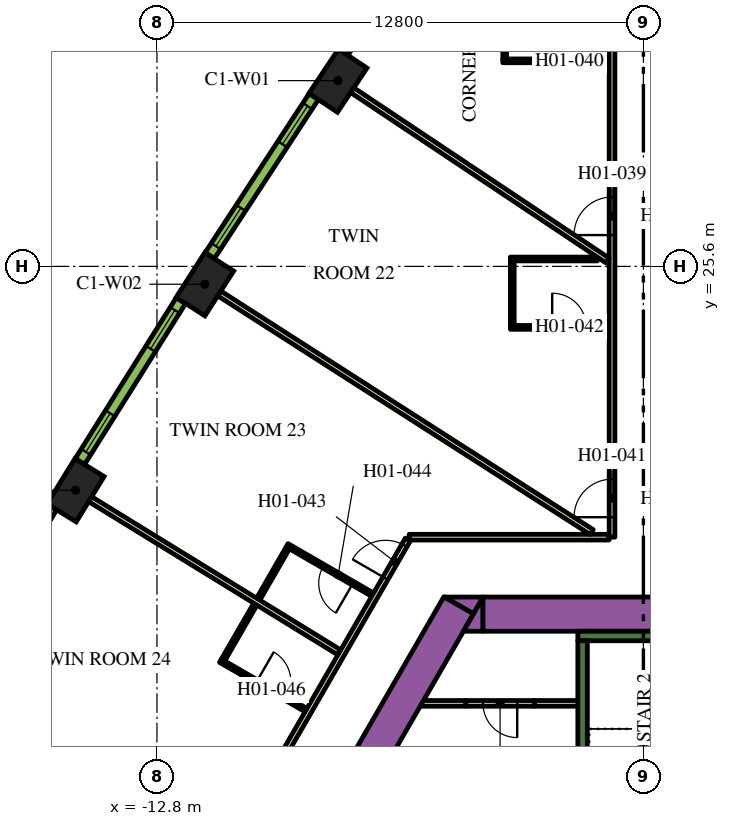
"""IFC4 building model, lengths in metres.
Left out: names, types, materials, properties, quantities, classifications, styles, units other than length and angle.
Written with IfcOpenShell. Run it as: python <this file> out.ifc"""

import sys

from ifc_helpers import new_model, si_unit, direction, frame, frame_2d, origin, origin_2d, place, context, subcontext, project, spatial, polyline, rectangle, outline, extrude, element, fill, save


model = new_model("IFC4")
c1 = context("Model", 3, precision=1e-05, world=origin(), true_north=direction((0.0, 1.0)))
c2 = subcontext(c1, "Body", "Model", "MODEL_VIEW")
j1 = project(units=[si_unit("LENGTHUNIT", "METRE"), si_unit("PLANEANGLEUNIT", "RADIAN")], contexts=[c1])
p1 = place(None, origin())
s1 = spatial("IfcSite", under=j1, at=p1, CompositionType="ELEMENT")
p2 = place(p1, origin())
s2 = spatial("IfcBuilding", under=s1, at=p2, CompositionType="ELEMENT")
p3 = place(p2, frame((0.0, 0.0, 31.5)))
s3 = spatial("IfcBuildingStorey", under=s2, at=p3, CompositionType="ELEMENT", Elevation=31.5)
for number, where, z_axis, x_axis in (
    (1, (-8.037, 30.487, 0.0), (0.0, 0.0, 1.0), (-0.555, -0.832, 0.0)),
    (2, (-11.539, 25.131, 0.0), (0.0, 0.0, 1.0), (-0.539, -0.842, 0.0)),
    (3, (-14.942, 19.71, 0.0), (0.0, 0.0, 1.0), (-0.524, -0.852, 0.0)),
):
    element("IfcColumn", number, at=place(p3, frame(where, z_axis=z_axis, x_axis=x_axis)), inside=s3, PredefinedType="COLUMN", context=c2, shape_type="SweptSolid", body=[
        extrude(rectangle(XDim=1.4, YDim=0.9, at=origin_2d()), origin(), (0.0, 0.0, 1.0), 3.9),
    ])
p4 = place(p3, frame((-15.36, -1.503, 0.0), z_axis=(0.0, 0.0, 1.0), x_axis=(0.50000389221, 0.866023156604, 0.0)))
e4 = element("IfcWall", 4, at=p4, inside=s3, PredefinedType="SOLIDWALL", context=c2, shape_type="SweptSolid", body=[
    extrude(rectangle(XDim=21.0, YDim=0.9, at=frame_2d((10.5, 0.0))), origin(), (0.0, 0.0, 1.0), 3.9),
])
p5 = place(p3, origin())
e5 = element("IfcWall", 5, at=p5, inside=s3, PredefinedType="SOLIDWALL", context=c2, shape_type="SweptSolid", body=[
    extrude(outline(polyline([(-4.215, 16.9), (-4.469, 16.46), (-5.231, 16.9), (-4.215, 16.9)])), origin(), (0.0, 0.0, 1.0), 3.9),
])
p6 = place(p3, frame((-4.224, 16.45, 0.0), z_axis=(0.0, 0.0, 1.0), x_axis=(1.0, 0.0, 0.0)))
e6 = element("IfcWall", 6, at=p6, inside=s3, PredefinedType="SOLIDWALL", context=c2, shape_type="SweptSolid", body=[
    extrude(rectangle(XDim=9.488, YDim=0.9, at=frame_2d((4.744, 0.0))), origin(), (0.0, 0.0, 1.0), 3.9),
])
e7 = element("IfcWall", 7, at=p5, inside=s3, PredefinedType="SOLIDWALL", context=c2, shape_type="SweptSolid", body=[
    extrude(outline(polyline([(-4.734, 16.0), (-4.226, 16.88), (-4.226, 16.0), (-4.734, 16.0)])), origin(), (0.0, 0.0, 1.0), 3.9),
])
p7 = place(p3, frame((-1.725, 15.875, 0.0), z_axis=(0.0, 0.0, 1.0), x_axis=(1.0, 0.0, 0.0)))
e8 = element("IfcWall", 8, at=p7, inside=s3, PredefinedType="SOLIDWALL", context=c2, shape_type="SweptSolid", body=[
    extrude(rectangle(XDim=3.45, YDim=0.25, at=frame_2d((1.725, 0.0))), origin(), (0.0, 0.0, 1.0), 3.9),
])
p8 = place(p3, frame((-1.6, 8.7, 0.0), z_axis=(0.0, 0.0, 1.0), x_axis=(0.0, 1.0, 0.0)))
e9 = element("IfcWall", 9, at=p8, inside=s3, PredefinedType="SOLIDWALL", context=c2, shape_type="SweptSolid", body=[
    extrude(rectangle(XDim=7.05, YDim=0.25, at=frame_2d((3.525, 0.0))), origin(), (0.0, 0.0, 1.0), 3.9),
])
p9 = place(p3, frame((-5.851, 14.102, 0.0), z_axis=(0.0, 0.0, 1.0), x_axis=(1.0, 0.0, 0.0)))
e10 = element("IfcWall", 10, at=p9, inside=s3, PredefinedType="PARTITIONING", context=c2, shape_type="SweptSolid", body=[
    extrude(rectangle(XDim=1.18, YDim=0.15, at=frame_2d((0.59, 0.0))), origin(), (0.0, 0.0, 1.0), 2.75),
])
p10 = place(p3, frame((-2.871, 14.102, 0.0), z_axis=(0.0, 0.0, 1.0), x_axis=(1.0, 0.0, 0.0)))
e11 = element("IfcWall", 11, at=p10, inside=s3, PredefinedType="PARTITIONING", context=c2, shape_type="SweptSolid", body=[
    extrude(rectangle(XDim=1.196, YDim=0.15, at=frame_2d((0.598, 0.0))), origin(), (0.0, 0.0, 1.0), 2.75),
])
p11 = place(p3, frame((-2.871, 14.102, 0.0), z_axis=(0.0, 0.0, 1.0), x_axis=(-1.0, 0.0, 0.0)))
e12 = element("IfcWall", 12, at=p11, inside=s3, PredefinedType="PARTITIONING", context=c2, shape_type="SweptSolid", body=[
    extrude(rectangle(XDim=1.8, YDim=0.15, at=frame_2d((0.9, 0.0))), origin(), (0.0, 0.0, 1.0), 2.75),
])
p12 = place(p11, frame((0.45, 0.0, 0.0)))
e13 = element("IfcOpeningElement", 13, at=p12, cuts=e12, PredefinedType="OPENING", context=c2, shape_type="SweptSolid", body=[
    extrude(rectangle(XDim=0.9, YDim=2.1, at=frame_2d((0.45, 1.05))), frame((0.0, 0.085, 0.0), z_axis=(0.0, -1.0, 0.0), x_axis=(1.0, 0.0, 0.0)), (0.0, 0.0, 1.0), 0.17),
])
p13 = place(p3, frame((-0.825, 18.475, 0.0), z_axis=(0.0, 0.0, 1.0), x_axis=(0.0, 1.0, 0.0)))
e14 = element("IfcWall", 14, at=p13, inside=s3, PredefinedType="PARTITIONING", context=c2, shape_type="SweptSolid", body=[
    extrude(rectangle(XDim=16.224, YDim=0.15, at=frame_2d((8.112, 0.0))), origin(), (0.0, 0.0, 1.0), 2.75),
])
p14 = place(p13, frame((7.949, 0.0, 0.0)))
e15 = element("IfcOpeningElement", 15, at=p14, cuts=e14, PredefinedType="OPENING", context=c2, shape_type="SweptSolid", body=[
    extrude(rectangle(XDim=1.0, YDim=2.1, at=frame_2d((0.5, 1.05))), frame((0.0, 0.085, 0.0), z_axis=(0.0, -1.0, 0.0), x_axis=(1.0, 0.0, 0.0)), (0.0, 0.0, 1.0), 0.17),
])
p15 = place(p13, frame((0.526, 0.0, 0.0)))
e16 = element("IfcOpeningElement", 16, at=p15, cuts=e14, PredefinedType="OPENING", context=c2, shape_type="SweptSolid", body=[
    extrude(rectangle(XDim=1.0, YDim=2.1, at=frame_2d((0.5, 1.05))), frame((0.0, 0.085, 0.0), z_axis=(0.0, -1.0, 0.0), x_axis=(1.0, 0.0, 0.0)), (0.0, 0.0, 1.0), 0.17),
])
p16 = place(p3, frame((-6.163, 18.475, 0.0), z_axis=(0.0, 0.0, 1.0), x_axis=(1.0, 0.0, 0.0)))
e17 = element("IfcWall", 17, at=p16, inside=s3, PredefinedType="PARTITIONING", context=c2, shape_type="SweptSolid", body=[
    extrude(rectangle(XDim=5.258, YDim=0.15, at=frame_2d((2.629, 0.0))), origin(), (0.0, 0.0, 1.0), 2.75),
])
p17 = place(p3, frame((-19.081, -3.9, 0.0), z_axis=(0.0, 0.0, 1.0), x_axis=(0.499998313975, 0.866026377209, 0.0)))
e18 = element("IfcWall", 18, at=p17, inside=s3, PredefinedType="PARTITIONING", context=c2, shape_type="SweptSolid", body=[
    extrude(rectangle(XDim=25.766, YDim=0.15, at=frame_2d((12.883, 0.0))), origin(), (0.0, 0.0, 1.0), 2.75),
])
p18 = place(p17, frame((24.586, 0.0, 0.0)))
e19 = element("IfcOpeningElement", 19, at=p18, cuts=e18, PredefinedType="OPENING", context=c2, shape_type="SweptSolid", body=[
    extrude(rectangle(XDim=1.0, YDim=2.1, at=frame_2d((0.5, 1.05))), frame((0.0, 0.085, 0.0), z_axis=(0.0, -1.0, 0.0), x_axis=(1.0, 0.0, 0.0)), (0.0, 0.0, 1.0), 0.17),
])
p19 = place(p17, frame((16.196, 0.0, 0.0)))
e20 = element("IfcOpeningElement", 20, at=p19, cuts=e18, PredefinedType="OPENING", context=c2, shape_type="SweptSolid", body=[
    extrude(rectangle(XDim=1.0, YDim=2.1, at=frame_2d((0.5, 1.05))), frame((0.0, 0.085, 0.0), z_axis=(0.0, -1.0, 0.0), x_axis=(1.0, 0.0, 0.0)), (0.0, 0.0, 1.0), 0.17),
])
p20 = place(p17, frame((14.789, 0.0, 0.0)))
e21 = element("IfcOpeningElement", 21, at=p20, cuts=e18, PredefinedType="OPENING", context=c2, shape_type="SweptSolid", body=[
    extrude(rectangle(XDim=1.1, YDim=2.1, at=frame_2d((0.55, 1.05))), frame((0.0, 0.085, 0.0), z_axis=(0.0, -1.0, 0.0), x_axis=(1.0, 0.0, 0.0)), (0.0, 0.0, 1.0), 0.17),
])
p21 = place(p17, frame((3.698, 0.0, 0.0)))
e22 = element("IfcOpeningElement", 22, at=p21, cuts=e18, PredefinedType="OPENING", context=c2, shape_type="SweptSolid", body=[
    extrude(rectangle(XDim=1.0, YDim=2.1, at=frame_2d((0.5, 1.05))), frame((0.0, 0.085, 0.0), z_axis=(0.0, -1.0, 0.0), x_axis=(1.0, 0.0, 0.0)), (0.0, 0.0, 1.0), 0.17),
])
p22 = place(p17, frame((1.531, 0.0, 0.0)))
e23 = element("IfcOpeningElement", 23, at=p22, cuts=e18, PredefinedType="OPENING", context=c2, shape_type="SweptSolid", body=[
    extrude(rectangle(XDim=0.9, YDim=2.1, at=frame_2d((0.45, 1.05))), frame((0.0, 0.085, 0.0), z_axis=(0.0, -1.0, 0.0), x_axis=(1.0, 0.0, 0.0)), (0.0, 0.0, 1.0), 0.17),
])
p23 = place(p3, frame((-17.856, 13.999, 0.0), z_axis=(0.0, 0.0, 1.0), x_axis=(0.861371519381, -0.507975497047, 0.0)))
e24 = element("IfcWall", 24, at=p23, inside=s3, PredefinedType="PARTITIONING", context=c2, shape_type="SweptSolid", body=[
    extrude(rectangle(XDim=7.804, YDim=0.15, at=frame_2d((3.902, 0.0))), origin(), (0.0, 0.0, 1.0), 2.75),
])
p24 = place(p3, frame((-14.558, 19.475, 0.0), z_axis=(0.0, 0.0, 1.0), x_axis=(0.851829455142, -0.523819223925, 0.0)))
e25 = element("IfcWall", 25, at=p24, inside=s3, PredefinedType="PARTITIONING", context=c2, shape_type="SweptSolid", body=[
    extrude(rectangle(XDim=7.688, YDim=0.15, at=frame_2d((3.844, 0.0))), origin(), (0.0, 0.0, 1.0), 2.75),
])
p25 = place(p3, frame((-11.16, 24.888, 0.0), z_axis=(0.0, 0.0, 1.0), x_axis=(0.84199813156, -0.539480441211, 0.0)))
e26 = element("IfcWall", 26, at=p25, inside=s3, PredefinedType="PARTITIONING", context=c2, shape_type="SweptSolid", body=[
    extrude(rectangle(XDim=11.638, YDim=0.15, at=frame_2d((5.819, 0.0))), origin(), (0.0, 0.0, 1.0), 2.75),
])
p26 = place(p3, frame((-7.662, 30.238, 0.0), z_axis=(0.0, 0.0, 1.0), x_axis=(0.831882886825, -0.554951225431, 0.0)))
e27 = element("IfcWall", 27, at=p26, inside=s3, PredefinedType="PARTITIONING", context=c2, shape_type="SweptSolid", body=[
    extrude(rectangle(XDim=8.079, YDim=0.15, at=frame_2d((4.04, 0.0))), origin(), (0.0, 0.0, 1.0), 2.75),
])
p27 = place(p3, frame((-3.7, 31.009, 0.0), z_axis=(0.0, 0.0, 1.0), x_axis=(1.0, 0.0, 0.0)))
e28 = element("IfcWall", 28, at=p27, inside=s3, PredefinedType="PARTITIONING", context=c2, shape_type="SweptSolid", body=[
    extrude(rectangle(XDim=2.8, YDim=0.1, at=frame_2d((1.4, 0.0))), origin(), (0.0, 0.0, 1.0), 2.75),
])
p28 = place(p27, frame((1.3, 0.0, 0.0)))
e29 = element("IfcOpeningElement", 29, at=p28, cuts=e28, PredefinedType="OPENING", context=c2, shape_type="SweptSolid", body=[
    extrude(rectangle(XDim=0.9, YDim=2.1, at=frame_2d((0.45, 1.05))), frame((0.0, 0.06, 0.0), z_axis=(0.0, -1.0, 0.0), x_axis=(1.0, 0.0, 0.0)), (0.0, 0.0, 1.0), 0.12),
])
p29 = place(p3, frame((-3.65, 31.059, 0.0), z_axis=(0.0, 0.0, 1.0), x_axis=(0.0, 1.0, 0.0)))
e30 = element("IfcWall", 30, at=p29, inside=s3, PredefinedType="PARTITIONING", context=c2, shape_type="SweptSolid", body=[
    extrude(rectangle(XDim=2.4, YDim=0.1, at=frame_2d((1.2, 0.0))), origin(), (0.0, 0.0, 1.0), 2.75),
])
p30 = place(p3, frame((-3.5, 23.995, 0.0), z_axis=(0.0, 0.0, 1.0), x_axis=(1.0, 0.0, 0.0)))
e31 = element("IfcWall", 31, at=p30, inside=s3, PredefinedType="PARTITIONING", context=c2, shape_type="SweptSolid", body=[
    extrude(rectangle(XDim=2.6, YDim=0.1, at=frame_2d((1.3, 0.0))), origin(), (0.0, 0.0, 1.0), 2.75),
])
p31 = place(p30, frame((1.1, 0.0, 0.0)))
e32 = element("IfcOpeningElement", 32, at=p31, cuts=e31, PredefinedType="OPENING", context=c2, shape_type="SweptSolid", body=[
    extrude(rectangle(XDim=0.9, YDim=2.1, at=frame_2d((0.45, 1.05))), frame((0.0, 0.06, 0.0), z_axis=(0.0, -1.0, 0.0), x_axis=(1.0, 0.0, 0.0)), (0.0, 0.0, 1.0), 0.12),
])
p32 = place(p3, frame((-3.45, 24.045, 0.0), z_axis=(0.0, 0.0, 1.0), x_axis=(0.0, 1.0, 0.0)))
e33 = element("IfcWall", 33, at=p32, inside=s3, PredefinedType="PARTITIONING", context=c2, shape_type="SweptSolid", body=[
    extrude(rectangle(XDim=1.7, YDim=0.1, at=frame_2d((0.85, 0.0))), origin(), (0.0, 0.0, 1.0), 2.75),
])
p33 = place(p3, frame((-1.21, 25.795, 0.0), z_axis=(0.0, 0.0, 1.0), x_axis=(-1.0, 0.0, 0.0)))
e34 = element("IfcWall", 34, at=p33, inside=s3, PredefinedType="PARTITIONING", context=c2, shape_type="SweptSolid", body=[
    extrude(rectangle(XDim=2.29, YDim=0.1, at=frame_2d((1.145, 0.0))), origin(), (0.0, 0.0, 1.0), 2.75),
])
p34 = place(p3, frame((-7.124, 16.961, 0.0), z_axis=(0.0, 0.0, 1.0), x_axis=(-0.866021400173, 0.500006934395, 0.0)))
e35 = element("IfcWall", 35, at=p34, inside=s3, PredefinedType="PARTITIONING", context=c2, shape_type="SweptSolid", body=[
    extrude(rectangle(XDim=2.6, YDim=0.1, at=frame_2d((1.3, 0.0))), origin(), (0.0, 0.0, 1.0), 2.75),
])
p35 = place(p34, frame((0.6, 0.0, 0.0)))
e36 = element("IfcOpeningElement", 36, at=p35, cuts=e35, PredefinedType="OPENING", context=c2, shape_type="SweptSolid", body=[
    extrude(rectangle(XDim=0.9, YDim=2.1, at=frame_2d((0.45, 1.05))), frame((0.0, 0.06, 0.0), z_axis=(0.0, -1.0, 0.0), x_axis=(1.0, 0.0, 0.0)), (0.0, 0.0, 1.0), 0.12),
])
p36 = place(p3, frame((-9.362, 18.184, 0.0), z_axis=(0.0, 0.0, 1.0), x_axis=(-0.499992328818, -0.866029832698, 0.0)))
e37 = element("IfcWall", 37, at=p36, inside=s3, PredefinedType="PARTITIONING", context=c2, shape_type="SweptSolid", body=[
    extrude(rectangle(XDim=1.54, YDim=0.1, at=frame_2d((0.77, 0.0))), origin(), (0.0, 0.0, 1.0), 2.75),
])
p37 = place(p3, frame((-11.129, 15.224, 0.0), z_axis=(0.0, 0.0, 1.0), x_axis=(0.866021400173, -0.500006934395, 0.0)))
e38 = element("IfcWall", 38, at=p37, inside=s3, PredefinedType="PARTITIONING", context=c2, shape_type="SweptSolid", body=[
    extrude(rectangle(XDim=2.6, YDim=0.1, at=frame_2d((1.3, 0.0))), origin(), (0.0, 0.0, 1.0), 2.75),
])
p38 = place(p37, frame((1.1, 0.0, 0.0)))
e39 = element("IfcOpeningElement", 39, at=p38, cuts=e38, PredefinedType="OPENING", context=c2, shape_type="SweptSolid", body=[
    extrude(rectangle(XDim=0.9, YDim=2.1, at=frame_2d((0.45, 1.05))), frame((0.0, 0.06, 0.0), z_axis=(0.0, -1.0, 0.0), x_axis=(1.0, 0.0, 0.0)), (0.0, 0.0, 1.0), 0.12),
])
p39 = place(p3, frame((-11.061, 15.242, 0.0), z_axis=(0.0, 0.0, 1.0), x_axis=(0.499976720371, 0.866038843867, 0.0)))
e40 = element("IfcWall", 40, at=p39, inside=s3, PredefinedType="PARTITIONING", context=c2, shape_type="SweptSolid", body=[
    extrude(rectangle(XDim=1.69, YDim=0.1, at=frame_2d((0.845, 0.0))), origin(), (0.0, 0.0, 1.0), 2.75),
])
p40 = place(p3, frame((-5.078, 35.376, 0.0), z_axis=(0.0, 0.0, 1.0), x_axis=(-0.562610153679, -0.826722332454, 0.0)))
e41 = element("IfcWall", 41, at=p40, inside=s3, PredefinedType="SOLIDWALL", context=c2, shape_type="SweptSolid", body=[
    extrude(rectangle(XDim=5.006, YDim=0.29, at=frame_2d((2.503, 0.0))), origin(), (0.0, 0.0, 1.0), 3.65),
])
p41 = place(p40, frame((0.265, 0.0, 0.9)))
e42 = element("IfcOpeningElement", 42, at=p41, cuts=e41, PredefinedType="OPENING", context=c2, shape_type="SweptSolid", body=[
    extrude(rectangle(XDim=1.2, YDim=2.15, at=frame_2d((0.6, 1.075))), frame((0.0, 0.155, 0.0), z_axis=(0.0, -1.0, 0.0), x_axis=(1.0, 0.0, 0.0)), (0.0, 0.0, 1.0), 0.31),
])
p42 = place(p40, frame((3.495, 0.0, 0.9)))
e43 = element("IfcOpeningElement", 43, at=p42, cuts=e41, PredefinedType="OPENING", context=c2, shape_type="SweptSolid", body=[
    extrude(rectangle(XDim=1.2, YDim=2.15, at=frame_2d((0.6, 1.075))), frame((0.0, 0.155, 0.0), z_axis=(0.0, -1.0, 0.0), x_axis=(1.0, 0.0, 0.0)), (0.0, 0.0, 1.0), 0.31),
])
p43 = place(p3, frame((-8.676, 30.068, 0.0), z_axis=(0.0, 0.0, 1.0), x_axis=(-0.547204617628, -0.836998868845, 0.0)))
e44 = element("IfcWall", 44, at=p43, inside=s3, PredefinedType="SOLIDWALL", context=c2, shape_type="SweptSolid", body=[
    extrude(rectangle(XDim=4.998, YDim=0.29, at=frame_2d((2.499, 0.0))), origin(), (0.0, 0.0, 1.0), 3.65),
])
p44 = place(p43, frame((0.297, 0.0, 0.9)))
e45 = element("IfcOpeningElement", 45, at=p44, cuts=e44, PredefinedType="OPENING", context=c2, shape_type="SweptSolid", body=[
    extrude(rectangle(XDim=1.2, YDim=2.15, at=frame_2d((0.6, 1.075))), frame((0.0, 0.155, 0.0), z_axis=(0.0, -1.0, 0.0), x_axis=(1.0, 0.0, 0.0)), (0.0, 0.0, 1.0), 0.31),
])
p45 = place(p43, frame((3.501, 0.0, 0.9)))
e46 = element("IfcOpeningElement", 46, at=p45, cuts=e44, PredefinedType="OPENING", context=c2, shape_type="SweptSolid", body=[
    extrude(rectangle(XDim=1.2, YDim=2.15, at=frame_2d((0.6, 1.075))), frame((0.0, 0.155, 0.0), z_axis=(0.0, -1.0, 0.0), x_axis=(1.0, 0.0, 0.0)), (0.0, 0.0, 1.0), 0.31),
])
p46 = place(p3, frame((-12.17, 24.699, 0.0), z_axis=(0.0, 0.0, 1.0), x_axis=(-0.531688286542, -0.846940119462, 0.0)))
e47 = element("IfcWall", 47, at=p46, inside=s3, PredefinedType="SOLIDWALL", context=c2, shape_type="SweptSolid", body=[
    extrude(rectangle(XDim=4.998, YDim=0.29, at=frame_2d((2.499, 0.0))), origin(), (0.0, 0.0, 1.0), 3.65),
])
p47 = place(p46, frame((0.297, 0.0, 0.9)))
e48 = element("IfcOpeningElement", 48, at=p47, cuts=e47, PredefinedType="OPENING", context=c2, shape_type="SweptSolid", body=[
    extrude(rectangle(XDim=1.2, YDim=2.15, at=frame_2d((0.6, 1.075))), frame((0.0, 0.155, 0.0), z_axis=(0.0, -1.0, 0.0), x_axis=(1.0, 0.0, 0.0)), (0.0, 0.0, 1.0), 0.31),
])
p48 = place(p46, frame((3.501, 0.0, 0.9)))
e49 = element("IfcOpeningElement", 49, at=p48, cuts=e47, PredefinedType="OPENING", context=c2, shape_type="SweptSolid", body=[
    extrude(rectangle(XDim=1.2, YDim=2.15, at=frame_2d((0.6, 1.075))), frame((0.0, 0.155, 0.0), z_axis=(0.0, -1.0, 0.0), x_axis=(1.0, 0.0, 0.0)), (0.0, 0.0, 1.0), 0.31),
])
p49 = place(p3, frame((-15.564, 19.267, 0.0), z_axis=(0.0, 0.0, 1.0), x_axis=(-0.515938796285, -0.856625448191, 0.0)))
e50 = element("IfcWall", 50, at=p49, inside=s3, PredefinedType="SOLIDWALL", context=c2, shape_type="SweptSolid", body=[
    extrude(rectangle(XDim=4.998, YDim=0.29, at=frame_2d((2.499, 0.0))), origin(), (0.0, 0.0, 1.0), 3.65),
])
p50 = place(p49, frame((0.297, 0.0, 0.9)))
e51 = element("IfcOpeningElement", 51, at=p50, cuts=e50, PredefinedType="OPENING", context=c2, shape_type="SweptSolid", body=[
    extrude(rectangle(XDim=1.2, YDim=2.15, at=frame_2d((0.6, 1.075))), frame((0.0, 0.155, 0.0), z_axis=(0.0, -1.0, 0.0), x_axis=(1.0, 0.0, 0.0)), (0.0, 0.0, 1.0), 0.31),
])
p51 = place(p49, frame((3.501, 0.0, 0.9)))
e52 = element("IfcOpeningElement", 52, at=p51, cuts=e50, PredefinedType="OPENING", context=c2, shape_type="SweptSolid", body=[
    extrude(rectangle(XDim=1.2, YDim=2.15, at=frame_2d((0.6, 1.075))), frame((0.0, 0.155, 0.0), z_axis=(0.0, -1.0, 0.0), x_axis=(1.0, 0.0, 0.0)), (0.0, 0.0, 1.0), 0.31),
])
p52 = place(p12, origin())
e53 = element("IfcDoor", 53, at=p52, inside=s3, OperationType="SINGLE_SWING_LEFT", PredefinedType="DOOR", context=c2, shape_type="SweptSolid", body=[
    extrude(rectangle(XDim=0.9, YDim=2.1, at=frame_2d((0.45, 1.05))), frame((0.0, 0.025, 0.0), z_axis=(0.0, -1.0, 0.0), x_axis=(1.0, 0.0, 0.0)), (0.0, 0.0, 1.0), 0.05),
])
fill(e13, e53)
p53 = place(p14, origin())
e54 = element("IfcDoor", 54, at=p53, inside=s3, OperationType="SINGLE_SWING_LEFT", PredefinedType="DOOR", context=c2, shape_type="SweptSolid", body=[
    extrude(rectangle(XDim=1.0, YDim=2.1, at=frame_2d((0.5, 1.05))), frame((0.0, 0.025, 0.0), z_axis=(0.0, -1.0, 0.0), x_axis=(1.0, 0.0, 0.0)), (0.0, 0.0, 1.0), 0.05),
])
fill(e15, e54)
p54 = place(p28, origin())
e55 = element("IfcDoor", 55, at=p54, inside=s3, OperationType="SINGLE_SWING_RIGHT", PredefinedType="DOOR", context=c2, shape_type="SweptSolid", body=[
    extrude(rectangle(XDim=0.9, YDim=2.1, at=frame_2d((0.45, 1.05))), frame((0.0, 0.025, 0.0), z_axis=(0.0, -1.0, 0.0), x_axis=(1.0, 0.0, 0.0)), (0.0, 0.0, 1.0), 0.05),
])
fill(e29, e55)
p55 = place(p15, origin())
e56 = element("IfcDoor", 56, at=p55, inside=s3, OperationType="SINGLE_SWING_LEFT", PredefinedType="DOOR", context=c2, shape_type="SweptSolid", body=[
    extrude(rectangle(XDim=1.0, YDim=2.1, at=frame_2d((0.5, 1.05))), frame((0.0, 0.025, 0.0), z_axis=(0.0, -1.0, 0.0), x_axis=(1.0, 0.0, 0.0)), (0.0, 0.0, 1.0), 0.05),
])
fill(e16, e56)
p56 = place(p31, origin())
e57 = element("IfcDoor", 57, at=p56, inside=s3, OperationType="SINGLE_SWING_LEFT", PredefinedType="DOOR", context=c2, shape_type="SweptSolid", body=[
    extrude(rectangle(XDim=0.9, YDim=2.1, at=frame_2d((0.45, 1.05))), frame((0.0, 0.025, 0.0), z_axis=(0.0, -1.0, 0.0), x_axis=(1.0, 0.0, 0.0)), (0.0, 0.0, 1.0), 0.05),
])
fill(e32, e57)
p57 = place(p18, origin())
e58 = element("IfcDoor", 58, at=p57, inside=s3, OperationType="SINGLE_SWING_RIGHT", PredefinedType="DOOR", context=c2, shape_type="SweptSolid", body=[
    extrude(rectangle(XDim=1.0, YDim=2.1, at=frame_2d((0.5, 1.05))), frame((0.0, 0.025, 0.0), z_axis=(0.0, -1.0, 0.0), x_axis=(1.0, 0.0, 0.0)), (0.0, 0.0, 1.0), 0.05),
])
fill(e19, e58)
p58 = place(p35, origin())
e59 = element("IfcDoor", 59, at=p58, inside=s3, OperationType="SINGLE_SWING_LEFT", PredefinedType="DOOR", context=c2, shape_type="SweptSolid", body=[
    extrude(rectangle(XDim=0.9, YDim=2.1, at=frame_2d((0.45, 1.05))), frame((0.0, 0.025, 0.0), z_axis=(0.0, -1.0, 0.0), x_axis=(1.0, 0.0, 0.0)), (0.0, 0.0, 1.0), 0.05),
])
fill(e36, e59)
p59 = place(p38, origin())
e60 = element("IfcDoor", 60, at=p59, inside=s3, OperationType="SINGLE_SWING_RIGHT", PredefinedType="DOOR", context=c2, shape_type="SweptSolid", body=[
    extrude(rectangle(XDim=0.9, YDim=2.1, at=frame_2d((0.45, 1.05))), frame((0.0, 0.025, 0.0), z_axis=(0.0, -1.0, 0.0), x_axis=(1.0, 0.0, 0.0)), (0.0, 0.0, 1.0), 0.05),
])
fill(e39, e60)
p60 = place(p44, origin())
e61 = element("IfcWindow", 61, at=p60, inside=s3, PartitioningType="DOUBLE_PANEL_VERTICAL", PredefinedType="WINDOW", context=c2, shape_type="SweptSolid", body=[
    extrude(rectangle(XDim=1.2, YDim=2.15, at=frame_2d((0.6, 1.075))), frame((0.0, 0.015, 0.0), z_axis=(0.0, -1.0, 0.0), x_axis=(1.0, 0.0, 0.0)), (0.0, 0.0, 1.0), 0.06),
])
fill(e45, e61)
p61 = place(p45, origin())
e62 = element("IfcWindow", 62, at=p61, inside=s3, PartitioningType="DOUBLE_PANEL_VERTICAL", PredefinedType="WINDOW", context=c2, shape_type="SweptSolid", body=[
    extrude(rectangle(XDim=1.2, YDim=2.15, at=frame_2d((0.6, 1.075))), frame((0.0, 0.015, 0.0), z_axis=(0.0, -1.0, 0.0), x_axis=(1.0, 0.0, 0.0)), (0.0, 0.0, 1.0), 0.06),
])
fill(e46, e62)
p62 = place(p47, origin())
e63 = element("IfcWindow", 63, at=p62, inside=s3, PartitioningType="DOUBLE_PANEL_VERTICAL", PredefinedType="WINDOW", context=c2, shape_type="SweptSolid", body=[
    extrude(rectangle(XDim=1.2, YDim=2.15, at=frame_2d((0.6, 1.075))), frame((0.0, 0.015, 0.0), z_axis=(0.0, -1.0, 0.0), x_axis=(1.0, 0.0, 0.0)), (0.0, 0.0, 1.0), 0.06),
])
fill(e48, e63)
p63 = place(p48, origin())
e64 = element("IfcWindow", 64, at=p63, inside=s3, PartitioningType="DOUBLE_PANEL_VERTICAL", PredefinedType="WINDOW", context=c2, shape_type="SweptSolid", body=[
    extrude(rectangle(XDim=1.2, YDim=2.15, at=frame_2d((0.6, 1.075))), frame((0.0, 0.015, 0.0), z_axis=(0.0, -1.0, 0.0), x_axis=(1.0, 0.0, 0.0)), (0.0, 0.0, 1.0), 0.06),
])
fill(e49, e64)
save(model, sys.argv[1])
